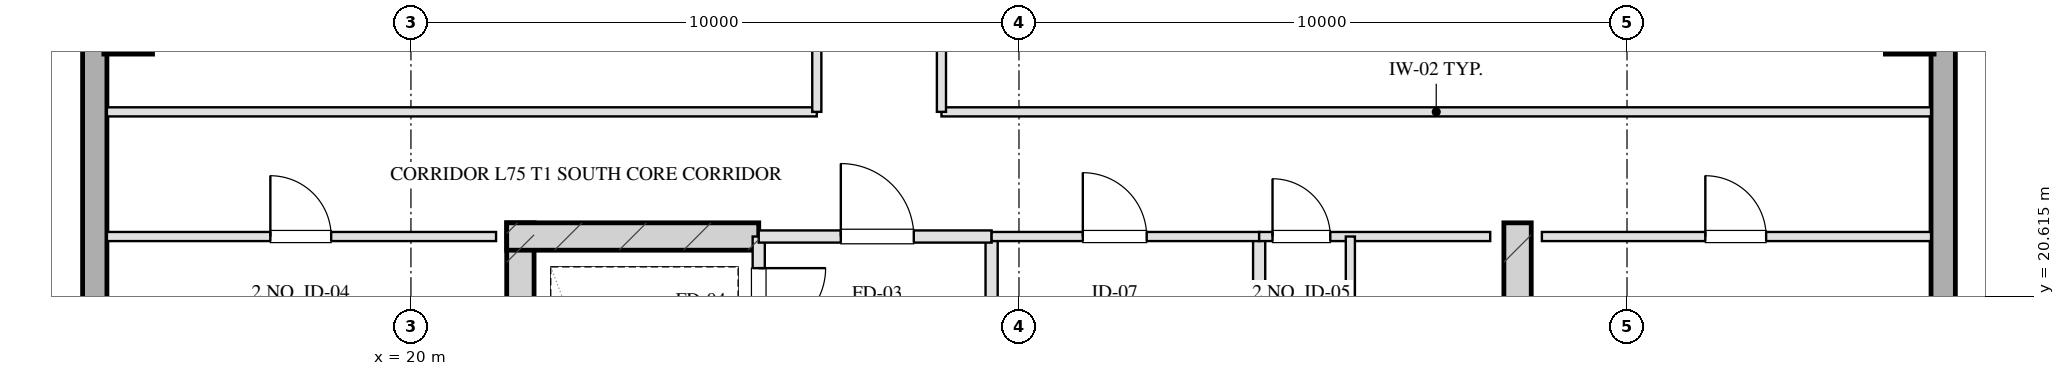
"""IFC4 building model, lengths in metres.
Left out: names, types, materials, properties, quantities, classifications, styles, units other than length and angle.
Written with IfcOpenShell. Run it as: python <this file> out.ifc"""

import sys

from ifc_helpers import new_model, si_unit, direction, frame, frame_2d, origin, origin_2d, place, context, subcontext, project, spatial, rectangle, hollow_rectangle, extrude, element, fill, save


model = new_model("IFC4")
c1 = context("Model", 3, precision=1e-05, world=origin(), true_north=direction((0.0, 1.0)))
c2 = subcontext(c1, "Body", "Model", "MODEL_VIEW")
j1 = project(units=[si_unit("LENGTHUNIT", "METRE"), si_unit("PLANEANGLEUNIT", "RADIAN")], contexts=[c1])
p1 = place(None, origin())
s1 = spatial("IfcSite", under=j1, at=p1, CompositionType="ELEMENT")
p2 = place(p1, origin())
s2 = spatial("IfcBuilding", under=s1, at=p2, CompositionType="ELEMENT")
p3 = place(p2, frame((0.0, 0.0, 272.8)))
s3 = spatial("IfcBuildingStorey", under=s2, at=p3, CompositionType="ELEMENT", Elevation=272.8)
for number, where, z_axis, x_axis in (
    (1, (21.8, 21.825, 0.0), (0.0, 0.0, 1.0), (0.0, -1.0, 0.0)),
    (2, (38.2, 21.825, 0.0), (0.0, 0.0, 1.0), (0.0, -1.0, 0.0)),
):
    element("IfcWall", number, at=place(p3, frame(where, z_axis=z_axis, x_axis=x_axis)), inside=s3, PredefinedType="SHEAR", context=c2, shape_type="SweptSolid", body=[
        extrude(rectangle(XDim=9.33, YDim=0.45, at=frame_2d((4.665, 0.0))), origin(), (0.0, 0.0, 1.0), 3.2),
    ])
p4 = place(p3, frame((21.575, 21.6, 0.0), z_axis=(0.0, 0.0, 1.0), x_axis=(1.0, 0.0, 0.0)))
e3 = element("IfcWall", 3, at=p4, inside=s3, PredefinedType="SHEAR", context=c2, shape_type="SweptSolid", body=[
    extrude(rectangle(XDim=4.145, YDim=0.45, at=frame_2d((2.073, 0.0))), origin(), (0.0, 0.0, 1.0), 3.2),
])
for number, where, z_axis, x_axis in (
    (4, (15.35, 25.0, 0.0), (0.0, 0.0, 1.0), (1.0, 0.0, 0.0)),
    (5, (44.65, 25.0, 0.0), (0.0, 0.0, 1.0), (1.0, 0.0, 0.0)),
):
    element("IfcColumn", number, at=place(p3, frame(where, z_axis=z_axis, x_axis=x_axis)), inside=s3, PredefinedType="COLUMN", context=c2, shape_type="SweptSolid", body=[
        extrude(hollow_rectangle(XDim=0.8, YDim=0.8, WallThickness=0.028, at=origin_2d()), origin(), (0.0, 0.0, 1.0), 3.201),
    ])
p5 = place(p3, frame((14.8, 13.1, 0.0), z_axis=(0.0, 0.0, 1.0), x_axis=(0.0, 1.0, 0.0)))
e6 = element("IfcWall", 6, at=p5, inside=s3, PredefinedType="SOLIDWALL", context=c2, shape_type="SweptSolid", body=[
    extrude(rectangle(XDim=41.8, YDim=0.4, at=frame_2d((20.9, 0.0))), origin(), (0.0, 0.0, 1.0), 2.36),
])
p6 = place(p5, frame((13.525, 0.0, 0.75)))
e7 = element("IfcOpeningElement", 7, at=p6, cuts=e6, PredefinedType="OPENING", context=c2, shape_type="SweptSolid", body=[
    extrude(rectangle(XDim=1.95, YDim=1.21, at=frame_2d((0.975, 0.605))), frame((0.0, 0.21, 0.0), z_axis=(0.0, -1.0, 0.0), x_axis=(1.0, 0.0, 0.0)), (0.0, 0.0, 1.0), 0.42),
])
p7 = place(p5, frame((17.325, 0.0, 0.75)))
e8 = element("IfcOpeningElement", 8, at=p7, cuts=e6, PredefinedType="OPENING", context=c2, shape_type="SweptSolid", body=[
    extrude(rectangle(XDim=1.95, YDim=1.21, at=frame_2d((0.975, 0.605))), frame((0.0, 0.21, 0.0), z_axis=(0.0, -1.0, 0.0), x_axis=(1.0, 0.0, 0.0)), (0.0, 0.0, 1.0), 0.42),
])
p8 = place(p5, frame((22.525, 0.0, 0.75)))
e9 = element("IfcOpeningElement", 9, at=p8, cuts=e6, PredefinedType="OPENING", context=c2, shape_type="SweptSolid", body=[
    extrude(rectangle(XDim=1.95, YDim=1.21, at=frame_2d((0.975, 0.605))), frame((0.0, 0.21, 0.0), z_axis=(0.0, -1.0, 0.0), x_axis=(1.0, 0.0, 0.0)), (0.0, 0.0, 1.0), 0.42),
])
p9 = place(p5, frame((26.325, 0.0, 0.75)))
e10 = element("IfcOpeningElement", 10, at=p9, cuts=e6, PredefinedType="OPENING", context=c2, shape_type="SweptSolid", body=[
    extrude(rectangle(XDim=1.95, YDim=1.21, at=frame_2d((0.975, 0.605))), frame((0.0, 0.21, 0.0), z_axis=(0.0, -1.0, 0.0), x_axis=(1.0, 0.0, 0.0)), (0.0, 0.0, 1.0), 0.42),
])
p10 = place(p3, frame((45.2, 54.9, 0.0), z_axis=(0.0, 0.0, 1.0), x_axis=(0.0, -1.0, 0.0)))
e11 = element("IfcWall", 11, at=p10, inside=s3, PredefinedType="SOLIDWALL", context=c2, shape_type="SweptSolid", body=[
    extrude(rectangle(XDim=41.8, YDim=0.4, at=frame_2d((20.9, 0.0))), origin(), (0.0, 0.0, 1.0), 2.36),
])
p11 = place(p10, frame((26.325, 0.0, 0.75)))
e12 = element("IfcOpeningElement", 12, at=p11, cuts=e11, PredefinedType="OPENING", context=c2, shape_type="SweptSolid", body=[
    extrude(rectangle(XDim=1.95, YDim=1.21, at=frame_2d((0.975, 0.605))), frame((0.0, 0.21, 0.0), z_axis=(0.0, -1.0, 0.0), x_axis=(1.0, 0.0, 0.0)), (0.0, 0.0, 1.0), 0.42),
])
p12 = place(p10, frame((22.525, 0.0, 0.75)))
e13 = element("IfcOpeningElement", 13, at=p12, cuts=e11, PredefinedType="OPENING", context=c2, shape_type="SweptSolid", body=[
    extrude(rectangle(XDim=1.95, YDim=1.21, at=frame_2d((0.975, 0.605))), frame((0.0, 0.21, 0.0), z_axis=(0.0, -1.0, 0.0), x_axis=(1.0, 0.0, 0.0)), (0.0, 0.0, 1.0), 0.42),
])
p13 = place(p10, frame((17.325, 0.0, 0.75)))
e14 = element("IfcOpeningElement", 14, at=p13, cuts=e11, PredefinedType="OPENING", context=c2, shape_type="SweptSolid", body=[
    extrude(rectangle(XDim=1.95, YDim=1.21, at=frame_2d((0.975, 0.605))), frame((0.0, 0.21, 0.0), z_axis=(0.0, -1.0, 0.0), x_axis=(1.0, 0.0, 0.0)), (0.0, 0.0, 1.0), 0.42),
])
p14 = place(p10, frame((13.525, 0.0, 0.75)))
e15 = element("IfcOpeningElement", 15, at=p14, cuts=e11, PredefinedType="OPENING", context=c2, shape_type="SweptSolid", body=[
    extrude(rectangle(XDim=1.95, YDim=1.21, at=frame_2d((0.975, 0.605))), frame((0.0, 0.21, 0.0), z_axis=(0.0, -1.0, 0.0), x_axis=(1.0, 0.0, 0.0)), (0.0, 0.0, 1.0), 0.42),
])
p15 = place(p3, frame((25.72, 21.6, 0.0), z_axis=(0.0, 0.0, 1.0), x_axis=(0.0, -1.0, 0.0)))
e16 = element("IfcWall", 16, at=p15, inside=s3, PredefinedType="PARTITIONING", context=c2, shape_type="SweptSolid", body=[
    extrude(rectangle(XDim=1.9, YDim=0.2, at=frame_2d((0.95, 0.0))), origin(), (0.0, 0.0, 1.0), 2.925),
])
p16 = place(p15, frame((0.52, 0.0, 0.0)))
e17 = element("IfcOpeningElement", 17, at=p16, cuts=e16, PredefinedType="OPENING", context=c2, shape_type="SweptSolid", body=[
    extrude(rectangle(XDim=1.1, YDim=2.05, at=frame_2d((0.55, 1.025))), frame((0.0, 0.11, 0.0), z_axis=(0.0, -1.0, 0.0), x_axis=(1.0, 0.0, 0.0)), (0.0, 0.0, 1.0), 0.22),
])
p17 = place(p3, frame((29.55, 21.6, 0.0), z_axis=(0.0, 0.0, 1.0), x_axis=(0.0, -1.0, 0.0)))
e18 = element("IfcWall", 18, at=p17, inside=s3, PredefinedType="PARTITIONING", context=c2, shape_type="SweptSolid", body=[
    extrude(rectangle(XDim=8.43, YDim=0.2, at=frame_2d((4.215, 0.0))), origin(), (0.0, 0.0, 1.0), 2.925),
])
p18 = place(p3, frame((25.72, 21.6, 0.0), z_axis=(0.0, 0.0, 1.0), x_axis=(1.0, 0.0, 0.0)))
e19 = element("IfcWall", 19, at=p18, inside=s3, PredefinedType="PARTITIONING", context=c2, shape_type="SweptSolid", body=[
    extrude(rectangle(XDim=3.83, YDim=0.2, at=frame_2d((1.915, 0.0))), origin(), (0.0, 0.0, 1.0), 2.925),
])
p19 = place(p18, frame((1.35, 0.0, 0.0)))
e20 = element("IfcOpeningElement", 20, at=p19, cuts=e19, PredefinedType="OPENING", context=c2, shape_type="SweptSolid", body=[
    extrude(rectangle(XDim=1.2, YDim=2.05, at=frame_2d((0.6, 1.025))), frame((0.0, 0.11, 0.0), z_axis=(0.0, -1.0, 0.0), x_axis=(1.0, 0.0, 0.0)), (0.0, 0.0, 1.0), 0.22),
])
p20 = place(p3, frame((33.95, 21.6, 0.0), z_axis=(0.0, 0.0, 1.0), x_axis=(0.0, -1.0, 0.0)))
e21 = element("IfcWall", 21, at=p20, inside=s3, PredefinedType="PARTITIONING", context=c2, shape_type="SweptSolid", body=[
    extrude(rectangle(XDim=8.43, YDim=0.2, at=frame_2d((4.215, 0.0))), origin(), (0.0, 0.0, 1.0), 2.925),
])
p21 = place(p3, frame((29.55, 21.6, 0.0), z_axis=(0.0, 0.0, 1.0), x_axis=(1.0, 0.0, 0.0)))
e22 = element("IfcWall", 22, at=p21, inside=s3, PredefinedType="PARTITIONING", context=c2, shape_type="SweptSolid", body=[
    extrude(rectangle(XDim=4.4, YDim=0.15, at=frame_2d((2.2, 0.0))), origin(), (0.0, 0.0, 1.0), 2.925),
])
p22 = place(p21, frame((1.5, 0.0, 0.0)))
e23 = element("IfcOpeningElement", 23, at=p22, cuts=e22, PredefinedType="OPENING", context=c2, shape_type="SweptSolid", body=[
    extrude(rectangle(XDim=1.05, YDim=2.05, at=frame_2d((0.525, 1.025))), frame((0.0, 0.085, 0.0), z_axis=(0.0, -1.0, 0.0), x_axis=(1.0, 0.0, 0.0)), (0.0, 0.0, 1.0), 0.17),
])
p23 = place(p3, frame((33.95, 21.6, 0.0), z_axis=(0.0, 0.0, 1.0), x_axis=(1.0, 0.0, 0.0)))
e24 = element("IfcWall", 24, at=p23, inside=s3, PredefinedType="PARTITIONING", context=c2, shape_type="SweptSolid", body=[
    extrude(rectangle(XDim=3.8, YDim=0.15, at=frame_2d((1.9, 0.0))), origin(), (0.0, 0.0, 1.0), 2.925),
])
p24 = place(p23, frame((0.22, 0.0, 0.0)))
e25 = element("IfcOpeningElement", 25, at=p24, cuts=e24, PredefinedType="OPENING", context=c2, shape_type="SweptSolid", body=[
    extrude(rectangle(XDim=0.95, YDim=2.05, at=frame_2d((0.475, 1.025))), frame((0.0, 0.085, 0.0), z_axis=(0.0, -1.0, 0.0), x_axis=(1.0, 0.0, 0.0)), (0.0, 0.0, 1.0), 0.17),
])
p25 = place(p3, frame((35.45, 21.6, 0.0), z_axis=(0.0, 0.0, 1.0), x_axis=(0.0, -1.0, 0.0)))
e26 = element("IfcWall", 26, at=p25, inside=s3, PredefinedType="PARTITIONING", context=c2, shape_type="SweptSolid", body=[
    extrude(rectangle(XDim=8.43, YDim=0.15, at=frame_2d((4.215, 0.0))), origin(), (0.0, 0.0, 1.0), 2.565),
])
p26 = place(p25, frame((2.55, 0.0, 0.0)))
e27 = element("IfcOpeningElement", 27, at=p26, cuts=e26, PredefinedType="OPENING", context=c2, shape_type="SweptSolid", body=[
    extrude(rectangle(XDim=0.95, YDim=2.05, at=frame_2d((0.475, 1.025))), frame((0.0, 0.085, 0.0), z_axis=(0.0, -1.0, 0.0), x_axis=(1.0, 0.0, 0.0)), (0.0, 0.0, 1.0), 0.17),
])
p27 = place(p25, frame((4.7, 0.0, 0.0)))
e28 = element("IfcOpeningElement", 28, at=p27, cuts=e26, PredefinedType="OPENING", context=c2, shape_type="SweptSolid", body=[
    extrude(rectangle(XDim=0.9, YDim=2.05, at=frame_2d((0.45, 1.025))), frame((0.0, 0.085, 0.0), z_axis=(0.0, -1.0, 0.0), x_axis=(1.0, 0.0, 0.0)), (0.0, 0.0, 1.0), 0.17),
])
p28 = place(p25, frame((6.8, 0.0, 0.0)))
e29 = element("IfcOpeningElement", 29, at=p28, cuts=e26, PredefinedType="OPENING", context=c2, shape_type="SweptSolid", body=[
    extrude(rectangle(XDim=0.9, YDim=2.05, at=frame_2d((0.45, 1.025))), frame((0.0, 0.085, 0.0), z_axis=(0.0, -1.0, 0.0), x_axis=(1.0, 0.0, 0.0)), (0.0, 0.0, 1.0), 0.17),
])
p29 = place(p3, frame((15.0, 21.6, 0.0), z_axis=(0.0, 0.0, 1.0), x_axis=(1.0, 0.0, 0.0)))
e30 = element("IfcWall", 30, at=p29, inside=s3, PredefinedType="PARTITIONING", context=c2, shape_type="SweptSolid", body=[
    extrude(rectangle(XDim=6.4, YDim=0.15, at=frame_2d((3.2, 0.0))), origin(), (0.0, 0.0, 1.0), 2.925),
])
p30 = place(p29, frame((2.688, 0.0, 0.0)))
e31 = element("IfcOpeningElement", 31, at=p30, cuts=e30, PredefinedType="OPENING", context=c2, shape_type="SweptSolid", body=[
    extrude(rectangle(XDim=1.0, YDim=2.05, at=frame_2d((0.5, 1.025))), frame((0.0, 0.085, 0.0), z_axis=(0.0, -1.0, 0.0), x_axis=(1.0, 0.0, 0.0)), (0.0, 0.0, 1.0), 0.17),
])
p31 = place(p3, frame((38.6, 21.6, 0.0), z_axis=(0.0, 0.0, 1.0), x_axis=(1.0, 0.0, 0.0)))
e32 = element("IfcWall", 32, at=p31, inside=s3, PredefinedType="PARTITIONING", context=c2, shape_type="SweptSolid", body=[
    extrude(rectangle(XDim=6.4, YDim=0.15, at=frame_2d((3.2, 0.0))), origin(), (0.0, 0.0, 1.0), 2.925),
])
p32 = place(p31, frame((2.688, 0.0, 0.0)))
e33 = element("IfcOpeningElement", 33, at=p32, cuts=e32, PredefinedType="OPENING", context=c2, shape_type="SweptSolid", body=[
    extrude(rectangle(XDim=1.0, YDim=2.05, at=frame_2d((0.5, 1.025))), frame((0.0, 0.085, 0.0), z_axis=(0.0, -1.0, 0.0), x_axis=(1.0, 0.0, 0.0)), (0.0, 0.0, 1.0), 0.17),
])
p33 = place(p3, frame((15.0, 23.65, 0.0), z_axis=(0.0, 0.0, 1.0), x_axis=(1.0, 0.0, 0.0)))
e34 = element("IfcWall", 34, at=p33, inside=s3, PredefinedType="PARTITIONING", context=c2, shape_type="SweptSolid", body=[
    extrude(rectangle(XDim=11.675, YDim=0.15, at=frame_2d((5.837, 0.0))), origin(), (0.0, 0.0, 1.0), 2.925),
])
p34 = place(p3, frame((28.725, 23.65, 0.0), z_axis=(0.0, 0.0, 1.0), x_axis=(1.0, 0.0, 0.0)))
e35 = element("IfcWall", 35, at=p34, inside=s3, PredefinedType="PARTITIONING", context=c2, shape_type="SweptSolid", body=[
    extrude(rectangle(XDim=16.275, YDim=0.15, at=frame_2d((8.137, 0.0))), origin(), (0.0, 0.0, 1.0), 2.925),
])
p35 = place(p3, frame((26.675, 23.65, 0.0), z_axis=(0.0, 0.0, 1.0), x_axis=(0.0, 1.0, 0.0)))
e36 = element("IfcWall", 36, at=p35, inside=s3, PredefinedType="PARTITIONING", context=c2, shape_type="SweptSolid", body=[
    extrude(rectangle(XDim=20.7, YDim=0.15, at=frame_2d((10.35, 0.0))), origin(), (0.0, 0.0, 1.0), 2.925),
])
p36 = place(p35, frame((2.175, 0.0, 0.0)))
e37 = element("IfcOpeningElement", 37, at=p36, cuts=e36, PredefinedType="OPENING", context=c2, shape_type="SweptSolid", body=[
    extrude(rectangle(XDim=0.85, YDim=2.05, at=frame_2d((0.425, 1.025))), frame((0.0, 0.085, 0.0), z_axis=(0.0, -1.0, 0.0), x_axis=(1.0, 0.0, 0.0)), (0.0, 0.0, 1.0), 0.17),
])
p37 = place(p35, frame((6.999, 0.0, 0.0)))
e38 = element("IfcOpeningElement", 38, at=p37, cuts=e36, PredefinedType="OPENING", context=c2, shape_type="SweptSolid", body=[
    extrude(rectangle(XDim=1.0, YDim=2.05, at=frame_2d((0.5, 1.025))), frame((0.0, 0.085, 0.0), z_axis=(0.0, -1.0, 0.0), x_axis=(1.0, 0.0, 0.0)), (0.0, 0.0, 1.0), 0.17),
])
p38 = place(p35, frame((11.838, 0.0, 0.0)))
e39 = element("IfcOpeningElement", 39, at=p38, cuts=e36, PredefinedType="OPENING", context=c2, shape_type="SweptSolid", body=[
    extrude(rectangle(XDim=1.05, YDim=2.05, at=frame_2d((0.525, 1.025))), frame((0.0, 0.085, 0.0), z_axis=(0.0, -1.0, 0.0), x_axis=(1.0, 0.0, 0.0)), (0.0, 0.0, 1.0), 0.17),
])
p39 = place(p35, frame((17.365, 0.0, 0.0)))
e40 = element("IfcOpeningElement", 40, at=p39, cuts=e36, PredefinedType="OPENING", context=c2, shape_type="SweptSolid", body=[
    extrude(rectangle(XDim=1.0, YDim=2.05, at=frame_2d((0.5, 1.025))), frame((0.0, 0.085, 0.0), z_axis=(0.0, -1.0, 0.0), x_axis=(1.0, 0.0, 0.0)), (0.0, 0.0, 1.0), 0.17),
])
p40 = place(p3, frame((28.725, 23.65, 0.0), z_axis=(0.0, 0.0, 1.0), x_axis=(0.0, 1.0, 0.0)))
e41 = element("IfcWall", 41, at=p40, inside=s3, PredefinedType="PARTITIONING", context=c2, shape_type="SweptSolid", body=[
    extrude(rectangle(XDim=20.7, YDim=0.15, at=frame_2d((10.35, 0.0))), origin(), (0.0, 0.0, 1.0), 2.925),
])
p41 = place(p40, frame((2.675, 0.0, 0.0)))
e42 = element("IfcOpeningElement", 42, at=p41, cuts=e41, PredefinedType="OPENING", context=c2, shape_type="SweptSolid", body=[
    extrude(rectangle(XDim=1.0, YDim=2.05, at=frame_2d((0.5, 1.025))), frame((0.0, 0.085, 0.0), z_axis=(0.0, -1.0, 0.0), x_axis=(1.0, 0.0, 0.0)), (0.0, 0.0, 1.0), 0.17),
])
p42 = place(p40, frame((9.857, 0.0, 0.0)))
e43 = element("IfcOpeningElement", 43, at=p42, cuts=e41, PredefinedType="OPENING", context=c2, shape_type="SweptSolid", body=[
    extrude(rectangle(XDim=1.0, YDim=2.05, at=frame_2d((0.5, 1.025))), frame((0.0, 0.085, 0.0), z_axis=(0.0, -1.0, 0.0), x_axis=(1.0, 0.0, 0.0)), (0.0, 0.0, 1.0), 0.17),
])
p43 = place(p40, frame((17.032, 0.0, 0.0)))
e44 = element("IfcOpeningElement", 44, at=p43, cuts=e41, PredefinedType="OPENING", context=c2, shape_type="SweptSolid", body=[
    extrude(rectangle(XDim=1.0, YDim=2.05, at=frame_2d((0.5, 1.025))), frame((0.0, 0.085, 0.0), z_axis=(0.0, -1.0, 0.0), x_axis=(1.0, 0.0, 0.0)), (0.0, 0.0, 1.0), 0.17),
])
p44 = place(p16, origin())
e45 = element("IfcDoor", 45, at=p44, inside=s3, OperationType="SINGLE_SWING_LEFT", PredefinedType="DOOR", context=c2, shape_type="SweptSolid", body=[
    extrude(rectangle(XDim=1.1, YDim=2.05, at=frame_2d((0.55, 1.025))), frame((0.0, 0.025, 0.0), z_axis=(0.0, -1.0, 0.0), x_axis=(1.0, 0.0, 0.0)), (0.0, 0.0, 1.0), 0.05),
])
fill(e17, e45)
p45 = place(p19, origin())
e46 = element("IfcDoor", 46, at=p45, inside=s3, OperationType="SINGLE_SWING_LEFT", PredefinedType="DOOR", context=c2, shape_type="SweptSolid", body=[
    extrude(rectangle(XDim=1.2, YDim=2.05, at=frame_2d((0.6, 1.025))), frame((0.0, 0.025, 0.0), z_axis=(0.0, -1.0, 0.0), x_axis=(1.0, 0.0, 0.0)), (0.0, 0.0, 1.0), 0.05),
])
fill(e20, e46)
p46 = place(p22, origin())
e47 = element("IfcDoor", 47, at=p46, inside=s3, OperationType="SINGLE_SWING_LEFT", PredefinedType="DOOR", context=c2, shape_type="SweptSolid", body=[
    extrude(rectangle(XDim=1.05, YDim=2.05, at=frame_2d((0.525, 1.025))), frame((0.0, 0.025, 0.0), z_axis=(0.0, -1.0, 0.0), x_axis=(1.0, 0.0, 0.0)), (0.0, 0.0, 1.0), 0.05),
])
fill(e23, e47)
p47 = place(p24, origin())
e48 = element("IfcDoor", 48, at=p47, inside=s3, OperationType="SINGLE_SWING_LEFT", PredefinedType="DOOR", context=c2, shape_type="SweptSolid", body=[
    extrude(rectangle(XDim=0.95, YDim=2.05, at=frame_2d((0.475, 1.025))), frame((0.0, 0.025, 0.0), z_axis=(0.0, -1.0, 0.0), x_axis=(1.0, 0.0, 0.0)), (0.0, 0.0, 1.0), 0.05),
])
fill(e25, e48)
p48 = place(p30, origin())
e49 = element("IfcDoor", 49, at=p48, inside=s3, OperationType="SINGLE_SWING_LEFT", PredefinedType="DOOR", context=c2, shape_type="SweptSolid", body=[
    extrude(rectangle(XDim=1.0, YDim=2.05, at=frame_2d((0.5, 1.025))), frame((0.0, 0.025, 0.0), z_axis=(0.0, -1.0, 0.0), x_axis=(1.0, 0.0, 0.0)), (0.0, 0.0, 1.0), 0.05),
])
fill(e31, e49)
p49 = place(p32, origin())
e50 = element("IfcDoor", 50, at=p49, inside=s3, OperationType="SINGLE_SWING_LEFT", PredefinedType="DOOR", context=c2, shape_type="SweptSolid", body=[
    extrude(rectangle(XDim=1.0, YDim=2.05, at=frame_2d((0.5, 1.025))), frame((0.0, 0.025, 0.0), z_axis=(0.0, -1.0, 0.0), x_axis=(1.0, 0.0, 0.0)), (0.0, 0.0, 1.0), 0.05),
])
fill(e33, e50)
save(model, sys.argv[1])
